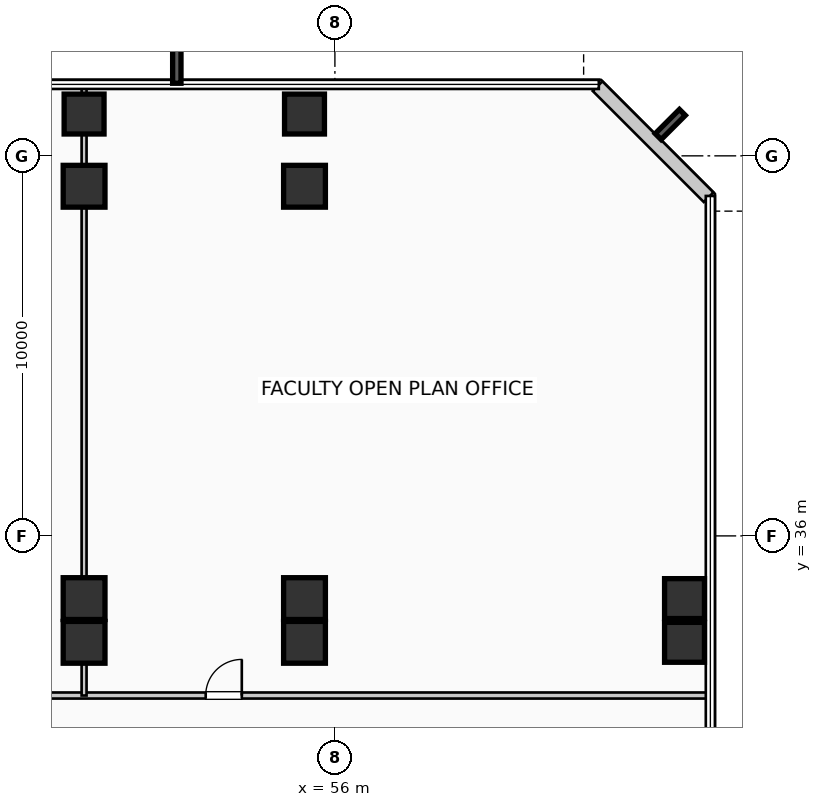
"""IFC4 building model, lengths in metres.
Left out: names, types, materials, properties, quantities, classifications, styles, units other than length and angle.
Written with IfcOpenShell. Run it as: python <this file> out.ifc"""

import sys

from ifc_helpers import new_model, si_unit, direction, frame, frame_2d, origin, origin_2d, place, context, subcontext, project, spatial, rectangle, extrude, element, fill, save


model = new_model("IFC4")
c1 = context("Model", 3, precision=1e-05, world=origin(), true_north=direction((0.0, 1.0)))
c2 = subcontext(c1, "Body", "Model", "MODEL_VIEW")
j1 = project(units=[si_unit("LENGTHUNIT", "METRE"), si_unit("PLANEANGLEUNIT", "RADIAN")], contexts=[c1])
p1 = place(None, origin())
s1 = spatial("IfcSite", under=j1, at=p1, CompositionType="ELEMENT")
p2 = place(p1, origin())
s2 = spatial("IfcBuilding", under=s1, at=p2, CompositionType="ELEMENT")
p3 = place(p2, frame((0.0, 0.0, 16.5)))
s3 = spatial("IfcBuildingStorey", under=s2, at=p3, CompositionType="ELEMENT", Elevation=16.5)
for number, where, z_axis, x_axis in (
    (1, (49.4, 33.2, 0.0), (0.0, 0.0, 1.0), (1.0, 0.0, 0.0)),
    (2, (49.4, 34.35, 0.0), (0.0, 0.0, 1.0), (1.0, 0.0, 0.0)),
    (3, (49.4, 45.2, 0.0), (0.0, 0.0, 1.0), (1.0, 0.0, 0.0)),
):
    element("IfcColumn", number, at=place(p3, frame(where, z_axis=z_axis, x_axis=x_axis)), inside=s3, PredefinedType="COLUMN", context=c2, shape_type="SweptSolid", body=[
        extrude(rectangle(XDim=1.1, YDim=1.1, at=origin_2d()), origin(), (0.0, 0.0, 1.0), 4.62),
    ])
p4 = place(p3, frame((49.4, 47.1, 0.0), z_axis=(0.0, 0.0, 1.0), x_axis=(1.0, 0.0, 0.0)))
e4 = element("IfcColumn", 4, at=p4, inside=s3, PredefinedType="COLUMN", context=c2, shape_type="SweptSolid", body=[
    extrude(rectangle(XDim=1.05, YDim=1.05, at=origin_2d()), origin(), (0.0, 0.0, 1.0), 4.62),
])
for number, where, z_axis, x_axis in (
    (5, (55.2, 33.2, 0.0), (0.0, 0.0, 1.0), (1.0, 0.0, 0.0)),
    (6, (55.2, 34.35, 0.0), (0.0, 0.0, 1.0), (1.0, 0.0, 0.0)),
    (7, (55.2, 45.2, 0.0), (0.0, 0.0, 1.0), (1.0, 0.0, 0.0)),
):
    element("IfcColumn", number, at=place(p3, frame(where, z_axis=z_axis, x_axis=x_axis)), inside=s3, PredefinedType="COLUMN", context=c2, shape_type="SweptSolid", body=[
        extrude(rectangle(XDim=1.1, YDim=1.1, at=origin_2d()), origin(), (0.0, 0.0, 1.0), 4.62),
    ])
for number, where, z_axis, x_axis in (
    (8, (55.2, 47.1, 0.0), (0.0, 0.0, 1.0), (1.0, 0.0, 0.0)),
    (9, (65.2, 33.2, 0.0), (0.0, 0.0, 1.0), (1.0, 0.0, 0.0)),
    (10, (65.2, 34.35, 0.0), (0.0, 0.0, 1.0), (1.0, 0.0, 0.0)),
):
    element("IfcColumn", number, at=place(p3, frame(where, z_axis=z_axis, x_axis=x_axis)), inside=s3, PredefinedType="COLUMN", context=c2, shape_type="SweptSolid", body=[
        extrude(rectangle(XDim=1.05, YDim=1.05, at=origin_2d()), origin(), (0.0, 0.0, 1.0), 4.62),
    ])
p5 = place(p3, frame((65.834, 44.912, 0.0), z_axis=(0.0, 0.0, 1.0), x_axis=(-0.707106781187, 0.707106781187, 0.0)))
e11 = element("IfcWall", 11, at=p5, inside=s3, PredefinedType="SOLIDWALL", context=c2, shape_type="SweptSolid", body=[
    extrude(rectangle(XDim=4.133, YDim=0.36, at=frame_2d((2.066, 0.0))), origin(), (0.0, 0.0, 1.0), 4.3),
])
p6 = place(p3, frame((23.6, 31.8, 0.0), z_axis=(0.0, 0.0, 1.0), x_axis=(1.0, 0.0, 0.0)))
e12 = element("IfcWall", 12, at=p6, inside=s3, PredefinedType="PARTITIONING", context=c2, shape_type="SweptSolid", body=[
    extrude(rectangle(XDim=42.21, YDim=0.16, at=frame_2d((21.105, 0.0))), origin(), (0.0, 0.0, 1.0), 4.3),
])
p7 = place(p6, frame((3.0, 0.0, 0.0)))
e13 = element("IfcOpeningElement", 13, at=p7, cuts=e12, PredefinedType="OPENING", context=c2, shape_type="SweptSolid", body=[
    extrude(rectangle(XDim=1.8, YDim=2.3, at=frame_2d((0.9, 1.15))), frame((0.0, 0.09, 0.0), z_axis=(0.0, -1.0, 0.0), x_axis=(1.0, 0.0, 0.0)), (0.0, 0.0, 1.0), 0.18),
])
p8 = place(p6, frame((10.0, 0.0, 0.0)))
e14 = element("IfcOpeningElement", 14, at=p8, cuts=e12, PredefinedType="OPENING", context=c2, shape_type="SweptSolid", body=[
    extrude(rectangle(XDim=0.95, YDim=2.15, at=frame_2d((0.475, 1.075))), frame((0.0, 0.09, 0.0), z_axis=(0.0, -1.0, 0.0), x_axis=(1.0, 0.0, 0.0)), (0.0, 0.0, 1.0), 0.18),
])
p9 = place(p6, frame((29.0, 0.0, 0.0)))
e15 = element("IfcOpeningElement", 15, at=p9, cuts=e12, PredefinedType="OPENING", context=c2, shape_type="SweptSolid", body=[
    extrude(rectangle(XDim=0.95, YDim=2.15, at=frame_2d((0.475, 1.075))), frame((0.0, 0.09, 0.0), z_axis=(0.0, -1.0, 0.0), x_axis=(1.0, 0.0, 0.0)), (0.0, 0.0, 1.0), 0.18),
])
p10 = place(p3, frame((49.4, 31.8, 0.0), z_axis=(0.0, 0.0, 1.0), x_axis=(0.0, 1.0, 0.0)))
e16 = element("IfcWall", 16, at=p10, inside=s3, PredefinedType="PARTITIONING", context=c2, shape_type="SweptSolid", body=[
    extrude(rectangle(XDim=16.01, YDim=0.13, at=frame_2d((8.005, 0.0))), origin(), (0.0, 0.0, 1.0), 3.485),
])
p11 = place(p9, origin())
e17 = element("IfcDoor", 17, at=p11, inside=s3, OperationType="SINGLE_SWING_RIGHT", PredefinedType="DOOR", context=c2, shape_type="SweptSolid", body=[
    extrude(rectangle(XDim=0.95, YDim=2.15, at=frame_2d((0.475, 1.075))), frame((0.0, 0.025, 0.0), z_axis=(0.0, -1.0, 0.0), x_axis=(1.0, 0.0, 0.0)), (0.0, 0.0, 1.0), 0.05),
])
fill(e15, e17)
save(model, sys.argv[1])
